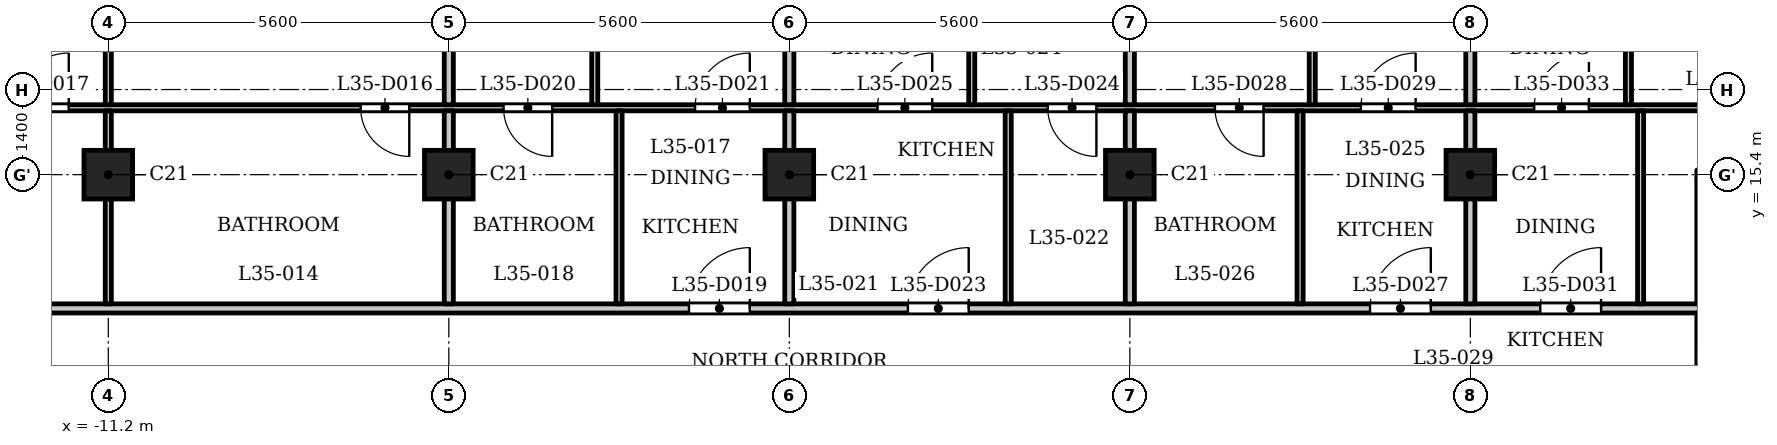
"""IFC4 building model, lengths in metres.
Left out: names, types, materials, properties, quantities, classifications, styles, units other than length and angle.
Written with IfcOpenShell. Run it as: python <this file> out.ifc"""

import sys

from ifc_helpers import new_model, si_unit, direction, frame, frame_2d, origin, origin_2d, place, context, subcontext, project, spatial, rectangle, extrude, element, fill, save


model = new_model("IFC4")
c1 = context("Model", 3, precision=1e-05, world=origin(), true_north=direction((0.0, 1.0)))
c2 = subcontext(c1, "Body", "Model", "MODEL_VIEW")
j1 = project(units=[si_unit("LENGTHUNIT", "METRE"), si_unit("PLANEANGLEUNIT", "RADIAN")], contexts=[c1])
p1 = place(None, origin())
s1 = spatial("IfcSite", under=j1, at=p1, CompositionType="ELEMENT")
p2 = place(p1, origin())
s2 = spatial("IfcBuilding", under=s1, at=p2, CompositionType="ELEMENT")
p3 = place(p2, frame((0.0, 0.0, 139.6)))
s3 = spatial("IfcBuildingStorey", under=s2, at=p3, CompositionType="ELEMENT", Elevation=139.6)
for number, where, z_axis, x_axis in (
    (1, (-11.2, 15.4, 0.0), (0.0, 0.0, 1.0), (1.0, 0.0, 0.0)),
    (2, (-5.6, 15.4, 0.0), (0.0, 0.0, 1.0), (1.0, 0.0, 0.0)),
    (3, (0.0, 15.4, 0.0), (0.0, 0.0, 1.0), (1.0, 0.0, 0.0)),
    (4, (5.6, 15.4, 0.0), (0.0, 0.0, 1.0), (1.0, 0.0, 0.0)),
    (5, (11.2, 15.4, 0.0), (0.0, 0.0, 1.0), (1.0, 0.0, 0.0)),
):
    element("IfcColumn", number, at=place(p3, frame(where, z_axis=z_axis, x_axis=x_axis)), inside=s3, PredefinedType="COLUMN", context=c2, shape_type="SweptSolid", body=[
        extrude(rectangle(XDim=0.8, YDim=0.8, at=origin_2d()), origin(), (0.0, 0.0, 1.0), 3.5),
    ])
p4 = place(p3, frame((-17.4, 13.2, 0.0), z_axis=(0.0, 0.0, 1.0), x_axis=(1.0, 0.0, 0.0)))
e6 = element("IfcWall", 6, at=p4, inside=s3, PredefinedType="PARTITIONING", context=c2, shape_type="SweptSolid", body=[
    extrude(rectangle(XDim=34.8, YDim=0.15, at=frame_2d((17.4, 0.0))), origin(), (0.0, 0.0, 1.0), 3.2),
])
p5 = place(p4, frame((0.25, 0.0, 0.0)))
e7 = element("IfcOpeningElement", 7, at=p5, cuts=e6, PredefinedType="OPENING", context=c2, shape_type="SweptSolid", body=[
    extrude(rectangle(XDim=1.0, YDim=2.1, at=frame_2d((0.5, 1.05))), frame((0.0, 0.085, 0.0), z_axis=(0.0, -1.0, 0.0), x_axis=(1.0, 0.0, 0.0)), (0.0, 0.0, 1.0), 0.17),
])
p6 = place(p4, frame((33.65, 0.0, 0.0)))
e8 = element("IfcOpeningElement", 8, at=p6, cuts=e6, PredefinedType="OPENING", context=c2, shape_type="SweptSolid", body=[
    extrude(rectangle(XDim=1.0, YDim=2.1, at=frame_2d((0.5, 1.05))), frame((0.0, 0.085, 0.0), z_axis=(0.0, -1.0, 0.0), x_axis=(1.0, 0.0, 0.0)), (0.0, 0.0, 1.0), 0.17),
])
p7 = place(p4, frame((15.75, 0.0, 0.0)))
e9 = element("IfcOpeningElement", 9, at=p7, cuts=e6, PredefinedType="OPENING", context=c2, shape_type="SweptSolid", body=[
    extrude(rectangle(XDim=1.0, YDim=2.1, at=frame_2d((0.5, 1.05))), frame((0.0, 0.085, 0.0), z_axis=(0.0, -1.0, 0.0), x_axis=(1.0, 0.0, 0.0)), (0.0, 0.0, 1.0), 0.17),
])
p8 = place(p4, frame((19.35, 0.0, 0.0)))
e10 = element("IfcOpeningElement", 10, at=p8, cuts=e6, PredefinedType="OPENING", context=c2, shape_type="SweptSolid", body=[
    extrude(rectangle(XDim=1.0, YDim=2.1, at=frame_2d((0.5, 1.05))), frame((0.0, 0.085, 0.0), z_axis=(0.0, -1.0, 0.0), x_axis=(1.0, 0.0, 0.0)), (0.0, 0.0, 1.0), 0.17),
])
p9 = place(p4, frame((26.95, 0.0, 0.0)))
e11 = element("IfcOpeningElement", 11, at=p9, cuts=e6, PredefinedType="OPENING", context=c2, shape_type="SweptSolid", body=[
    extrude(rectangle(XDim=1.0, YDim=2.1, at=frame_2d((0.5, 1.05))), frame((0.0, 0.085, 0.0), z_axis=(0.0, -1.0, 0.0), x_axis=(1.0, 0.0, 0.0)), (0.0, 0.0, 1.0), 0.17),
])
p10 = place(p4, frame((29.75, 0.0, 0.0)))
e12 = element("IfcOpeningElement", 12, at=p10, cuts=e6, PredefinedType="OPENING", context=c2, shape_type="SweptSolid", body=[
    extrude(rectangle(XDim=1.0, YDim=2.1, at=frame_2d((0.5, 1.05))), frame((0.0, 0.085, 0.0), z_axis=(0.0, -1.0, 0.0), x_axis=(1.0, 0.0, 0.0)), (0.0, 0.0, 1.0), 0.17),
])
p11 = place(p3, frame((14.925, 15.4, 0.0), z_axis=(0.0, 0.0, 1.0), x_axis=(1.0, 0.0, 0.0)))
e13 = element("IfcWall", 13, at=p11, inside=s3, PredefinedType="PARTITIONING", context=c2, shape_type="SweptSolid", body=[
    extrude(rectangle(XDim=12.559, YDim=0.15, at=frame_2d((6.279, 0.0))), origin(), (0.0, 0.0, 1.0), 3.2),
])
p12 = place(p11, frame((5.825, 0.0, 0.0)))
e14 = element("IfcOpeningElement", 14, at=p12, cuts=e13, PredefinedType="OPENING", context=c2, shape_type="SweptSolid", body=[
    extrude(rectangle(XDim=1.0, YDim=2.1, at=frame_2d((0.5, 1.05))), frame((0.0, 0.085, 0.0), z_axis=(0.0, -1.0, 0.0), x_axis=(1.0, 0.0, 0.0)), (0.0, 0.0, 1.0), 0.17),
])
p13 = place(p3, frame((-16.725, 16.5, 0.0), z_axis=(0.0, 0.0, 1.0), x_axis=(1.0, 0.0, 0.0)))
e15 = element("IfcWall", 15, at=p13, inside=s3, PredefinedType="PARTITIONING", context=c2, shape_type="SweptSolid", body=[
    extrude(rectangle(XDim=33.45, YDim=0.1, at=frame_2d((16.725, 0.0))), origin(), (0.0, 0.0, 1.0), 3.2),
])
p14 = place(p13, frame((9.675, 0.0, 0.0)))
e16 = element("IfcOpeningElement", 16, at=p14, cuts=e15, PredefinedType="OPENING", context=c2, shape_type="SweptSolid", body=[
    extrude(rectangle(XDim=0.8, YDim=2.1, at=frame_2d((0.4, 1.05))), frame((0.0, 0.06, 0.0), z_axis=(0.0, -1.0, 0.0), x_axis=(1.0, 0.0, 0.0)), (0.0, 0.0, 1.0), 0.12),
])
p15 = place(p13, frame((3.975, 0.0, 0.0)))
e17 = element("IfcOpeningElement", 17, at=p15, cuts=e15, PredefinedType="OPENING", context=c2, shape_type="SweptSolid", body=[
    extrude(rectangle(XDim=0.9, YDim=2.1, at=frame_2d((0.45, 1.05))), frame((0.0, 0.06, 0.0), z_axis=(0.0, -1.0, 0.0), x_axis=(1.0, 0.0, 0.0)), (0.0, 0.0, 1.0), 0.12),
])
p16 = place(p13, frame((12.025, 0.0, 0.0)))
e18 = element("IfcOpeningElement", 18, at=p16, cuts=e15, PredefinedType="OPENING", context=c2, shape_type="SweptSolid", body=[
    extrude(rectangle(XDim=0.8, YDim=2.1, at=frame_2d((0.4, 1.05))), frame((0.0, 0.06, 0.0), z_axis=(0.0, -1.0, 0.0), x_axis=(1.0, 0.0, 0.0)), (0.0, 0.0, 1.0), 0.12),
])
p17 = place(p13, frame((15.175, 0.0, 0.0)))
e19 = element("IfcOpeningElement", 19, at=p17, cuts=e15, PredefinedType="OPENING", context=c2, shape_type="SweptSolid", body=[
    extrude(rectangle(XDim=0.9, YDim=2.1, at=frame_2d((0.45, 1.05))), frame((0.0, 0.06, 0.0), z_axis=(0.0, -1.0, 0.0), x_axis=(1.0, 0.0, 0.0)), (0.0, 0.0, 1.0), 0.12),
])
p18 = place(p13, frame((20.975, 0.0, 0.0)))
e20 = element("IfcOpeningElement", 20, at=p18, cuts=e15, PredefinedType="OPENING", context=c2, shape_type="SweptSolid", body=[
    extrude(rectangle(XDim=0.8, YDim=2.1, at=frame_2d((0.4, 1.05))), frame((0.0, 0.06, 0.0), z_axis=(0.0, -1.0, 0.0), x_axis=(1.0, 0.0, 0.0)), (0.0, 0.0, 1.0), 0.12),
])
p19 = place(p13, frame((18.175, 0.0, 0.0)))
e21 = element("IfcOpeningElement", 21, at=p19, cuts=e15, PredefinedType="OPENING", context=c2, shape_type="SweptSolid", body=[
    extrude(rectangle(XDim=0.9, YDim=2.1, at=frame_2d((0.45, 1.05))), frame((0.0, 0.06, 0.0), z_axis=(0.0, -1.0, 0.0), x_axis=(1.0, 0.0, 0.0)), (0.0, 0.0, 1.0), 0.12),
])
p20 = place(p13, frame((23.725, 0.0, 0.0)))
e22 = element("IfcOpeningElement", 22, at=p20, cuts=e15, PredefinedType="OPENING", context=c2, shape_type="SweptSolid", body=[
    extrude(rectangle(XDim=0.8, YDim=2.1, at=frame_2d((0.4, 1.05))), frame((0.0, 0.06, 0.0), z_axis=(0.0, -1.0, 0.0), x_axis=(1.0, 0.0, 0.0)), (0.0, 0.0, 1.0), 0.12),
])
p21 = place(p13, frame((26.125, 0.0, 0.0)))
e23 = element("IfcOpeningElement", 23, at=p21, cuts=e15, PredefinedType="OPENING", context=c2, shape_type="SweptSolid", body=[
    extrude(rectangle(XDim=0.9, YDim=2.1, at=frame_2d((0.45, 1.05))), frame((0.0, 0.06, 0.0), z_axis=(0.0, -1.0, 0.0), x_axis=(1.0, 0.0, 0.0)), (0.0, 0.0, 1.0), 0.12),
])
p22 = place(p13, frame((32.125, 0.0, 0.0)))
e24 = element("IfcOpeningElement", 24, at=p22, cuts=e15, PredefinedType="OPENING", context=c2, shape_type="SweptSolid", body=[
    extrude(rectangle(XDim=0.8, YDim=2.1, at=frame_2d((0.4, 1.05))), frame((0.0, 0.06, 0.0), z_axis=(0.0, -1.0, 0.0), x_axis=(1.0, 0.0, 0.0)), (0.0, 0.0, 1.0), 0.12),
])
p23 = place(p13, frame((28.975, 0.0, 0.0)))
e25 = element("IfcOpeningElement", 25, at=p23, cuts=e15, PredefinedType="OPENING", context=c2, shape_type="SweptSolid", body=[
    extrude(rectangle(XDim=0.9, YDim=2.1, at=frame_2d((0.45, 1.05))), frame((0.0, 0.06, 0.0), z_axis=(0.0, -1.0, 0.0), x_axis=(1.0, 0.0, 0.0)), (0.0, 0.0, 1.0), 0.12),
])
p24 = place(p3, frame((-11.2, 13.275, 0.0), z_axis=(0.0, 0.0, 1.0), x_axis=(0.0, 1.0, 0.0)))
e26 = element("IfcWall", 26, at=p24, inside=s3, PredefinedType="PARTITIONING", context=c2, shape_type="SweptSolid", body=[
    extrude(rectangle(XDim=3.175, YDim=0.1, at=frame_2d((1.587, 0.0))), origin(), (0.0, 0.0, 1.0), 3.2),
])
p25 = place(p3, frame((-11.2, 16.55, 0.0), z_axis=(0.0, 0.0, 1.0), x_axis=(0.0, 1.0, 0.0)))
e27 = element("IfcWall", 27, at=p25, inside=s3, PredefinedType="PARTITIONING", context=c2, shape_type="SweptSolid", body=[
    extrude(rectangle(XDim=6.38, YDim=0.1, at=frame_2d((3.19, 0.0))), origin(), (0.0, 0.0, 1.0), 3.2),
])
p26 = place(p25, frame((4.1, 0.0, 0.0)))
e28 = element("IfcOpeningElement", 28, at=p26, cuts=e27, PredefinedType="OPENING", context=c2, shape_type="SweptSolid", body=[
    extrude(rectangle(XDim=0.9, YDim=2.1, at=frame_2d((0.45, 1.05))), frame((0.0, 0.06, 0.0), z_axis=(0.0, -1.0, 0.0), x_axis=(1.0, 0.0, 0.0)), (0.0, 0.0, 1.0), 0.12),
])
p27 = place(p3, frame((-5.6, 13.275, 0.0), z_axis=(0.0, 0.0, 1.0), x_axis=(0.0, 1.0, 0.0)))
e29 = element("IfcWall", 29, at=p27, inside=s3, PredefinedType="PARTITIONING", context=c2, shape_type="SweptSolid", body=[
    extrude(rectangle(XDim=3.175, YDim=0.15, at=frame_2d((1.587, 0.0))), origin(), (0.0, 0.0, 1.0), 3.2),
])
p28 = place(p3, frame((-5.6, 16.55, 0.0), z_axis=(0.0, 0.0, 1.0), x_axis=(0.0, 1.0, 0.0)))
e30 = element("IfcWall", 30, at=p28, inside=s3, PredefinedType="PARTITIONING", context=c2, shape_type="SweptSolid", body=[
    extrude(rectangle(XDim=6.38, YDim=0.15, at=frame_2d((3.19, 0.0))), origin(), (0.0, 0.0, 1.0), 3.2),
])
p29 = place(p3, frame((-3.2, 16.55, 0.0), z_axis=(0.0, 0.0, 1.0), x_axis=(0.0, 1.0, 0.0)))
e31 = element("IfcWall", 31, at=p29, inside=s3, PredefinedType="PARTITIONING", context=c2, shape_type="SweptSolid", body=[
    extrude(rectangle(XDim=5.53, YDim=0.1, at=frame_2d((2.765, 0.0))), origin(), (0.0, 0.0, 1.0), 3.2),
])
p30 = place(p29, frame((1.46, 0.0, 0.0)))
e32 = element("IfcOpeningElement", 32, at=p30, cuts=e31, PredefinedType="OPENING", context=c2, shape_type="SweptSolid", body=[
    extrude(rectangle(XDim=0.9, YDim=2.1, at=frame_2d((0.45, 1.05))), frame((0.0, 0.06, 0.0), z_axis=(0.0, -1.0, 0.0), x_axis=(1.0, 0.0, 0.0)), (0.0, 0.0, 1.0), 0.12),
])
p31 = place(p3, frame((-2.8, 13.275, 0.0), z_axis=(0.0, 0.0, 1.0), x_axis=(0.0, 1.0, 0.0)))
e33 = element("IfcWall", 33, at=p31, inside=s3, PredefinedType="PARTITIONING", context=c2, shape_type="SweptSolid", body=[
    extrude(rectangle(XDim=3.175, YDim=0.1, at=frame_2d((1.587, 0.0))), origin(), (0.0, 0.0, 1.0), 3.2),
])
p32 = place(p3, frame((0.0, 13.275, 0.0), z_axis=(0.0, 0.0, 1.0), x_axis=(0.0, 1.0, 0.0)))
e34 = element("IfcWall", 34, at=p32, inside=s3, PredefinedType="PARTITIONING", context=c2, shape_type="SweptSolid", body=[
    extrude(rectangle(XDim=3.175, YDim=0.15, at=frame_2d((1.587, 0.0))), origin(), (0.0, 0.0, 1.0), 3.2),
])
p33 = place(p3, frame((0.0, 16.55, 0.0), z_axis=(0.0, 0.0, 1.0), x_axis=(0.0, 1.0, 0.0)))
e35 = element("IfcWall", 35, at=p33, inside=s3, PredefinedType="PARTITIONING", context=c2, shape_type="SweptSolid", body=[
    extrude(rectangle(XDim=6.38, YDim=0.15, at=frame_2d((3.19, 0.0))), origin(), (0.0, 0.0, 1.0), 3.2),
])
p34 = place(p3, frame((3.0, 16.55, 0.0), z_axis=(0.0, 0.0, 1.0), x_axis=(0.0, 1.0, 0.0)))
e36 = element("IfcWall", 36, at=p34, inside=s3, PredefinedType="PARTITIONING", context=c2, shape_type="SweptSolid", body=[
    extrude(rectangle(XDim=5.53, YDim=0.1, at=frame_2d((2.765, 0.0))), origin(), (0.0, 0.0, 1.0), 3.2),
])
p35 = place(p34, frame((4.35, 0.0, 0.0)))
e37 = element("IfcOpeningElement", 37, at=p35, cuts=e36, PredefinedType="OPENING", context=c2, shape_type="SweptSolid", body=[
    extrude(rectangle(XDim=0.9, YDim=2.1, at=frame_2d((0.45, 1.05))), frame((0.0, 0.06, 0.0), z_axis=(0.0, -1.0, 0.0), x_axis=(1.0, 0.0, 0.0)), (0.0, 0.0, 1.0), 0.12),
])
p36 = place(p3, frame((3.6, 13.275, 0.0), z_axis=(0.0, 0.0, 1.0), x_axis=(0.0, 1.0, 0.0)))
e38 = element("IfcWall", 38, at=p36, inside=s3, PredefinedType="PARTITIONING", context=c2, shape_type="SweptSolid", body=[
    extrude(rectangle(XDim=3.175, YDim=0.1, at=frame_2d((1.587, 0.0))), origin(), (0.0, 0.0, 1.0), 3.2),
])
p37 = place(p3, frame((5.6, 13.275, 0.0), z_axis=(0.0, 0.0, 1.0), x_axis=(0.0, 1.0, 0.0)))
e39 = element("IfcWall", 39, at=p37, inside=s3, PredefinedType="PARTITIONING", context=c2, shape_type="SweptSolid", body=[
    extrude(rectangle(XDim=3.175, YDim=0.15, at=frame_2d((1.587, 0.0))), origin(), (0.0, 0.0, 1.0), 3.2),
])
p38 = place(p3, frame((5.6, 16.55, 0.0), z_axis=(0.0, 0.0, 1.0), x_axis=(0.0, 1.0, 0.0)))
e40 = element("IfcWall", 40, at=p38, inside=s3, PredefinedType="PARTITIONING", context=c2, shape_type="SweptSolid", body=[
    extrude(rectangle(XDim=6.38, YDim=0.15, at=frame_2d((3.19, 0.0))), origin(), (0.0, 0.0, 1.0), 3.2),
])
p39 = place(p3, frame((8.4, 13.275, 0.0), z_axis=(0.0, 0.0, 1.0), x_axis=(0.0, 1.0, 0.0)))
e41 = element("IfcWall", 41, at=p39, inside=s3, PredefinedType="PARTITIONING", context=c2, shape_type="SweptSolid", body=[
    extrude(rectangle(XDim=3.175, YDim=0.1, at=frame_2d((1.587, 0.0))), origin(), (0.0, 0.0, 1.0), 3.2),
])
p40 = place(p3, frame((8.6, 16.55, 0.0), z_axis=(0.0, 0.0, 1.0), x_axis=(0.0, 1.0, 0.0)))
e42 = element("IfcWall", 42, at=p40, inside=s3, PredefinedType="PARTITIONING", context=c2, shape_type="SweptSolid", body=[
    extrude(rectangle(XDim=5.53, YDim=0.1, at=frame_2d((2.765, 0.0))), origin(), (0.0, 0.0, 1.0), 3.2),
])
p41 = place(p40, frame((1.21, 0.0, 0.0)))
e43 = element("IfcOpeningElement", 43, at=p41, cuts=e42, PredefinedType="OPENING", context=c2, shape_type="SweptSolid", body=[
    extrude(rectangle(XDim=0.9, YDim=2.1, at=frame_2d((0.45, 1.05))), frame((0.0, 0.06, 0.0), z_axis=(0.0, -1.0, 0.0), x_axis=(1.0, 0.0, 0.0)), (0.0, 0.0, 1.0), 0.12),
])
p42 = place(p3, frame((11.2, 13.275, 0.0), z_axis=(0.0, 0.0, 1.0), x_axis=(0.0, 1.0, 0.0)))
e44 = element("IfcWall", 44, at=p42, inside=s3, PredefinedType="PARTITIONING", context=c2, shape_type="SweptSolid", body=[
    extrude(rectangle(XDim=3.175, YDim=0.15, at=frame_2d((1.587, 0.0))), origin(), (0.0, 0.0, 1.0), 3.2),
])
p43 = place(p3, frame((11.2, 16.55, 0.0), z_axis=(0.0, 0.0, 1.0), x_axis=(0.0, 1.0, 0.0)))
e45 = element("IfcWall", 45, at=p43, inside=s3, PredefinedType="PARTITIONING", context=c2, shape_type="SweptSolid", body=[
    extrude(rectangle(XDim=6.38, YDim=0.15, at=frame_2d((3.19, 0.0))), origin(), (0.0, 0.0, 1.0), 3.2),
])
p44 = place(p3, frame((13.8, 16.55, 0.0), z_axis=(0.0, 0.0, 1.0), x_axis=(0.0, 1.0, 0.0)))
e46 = element("IfcWall", 46, at=p44, inside=s3, PredefinedType="PARTITIONING", context=c2, shape_type="SweptSolid", body=[
    extrude(rectangle(XDim=5.53, YDim=0.1, at=frame_2d((2.765, 0.0))), origin(), (0.0, 0.0, 1.0), 3.2),
])
p45 = place(p44, frame((4.35, 0.0, 0.0)))
e47 = element("IfcOpeningElement", 47, at=p45, cuts=e46, PredefinedType="OPENING", context=c2, shape_type="SweptSolid", body=[
    extrude(rectangle(XDim=0.9, YDim=2.1, at=frame_2d((0.45, 1.05))), frame((0.0, 0.06, 0.0), z_axis=(0.0, -1.0, 0.0), x_axis=(1.0, 0.0, 0.0)), (0.0, 0.0, 1.0), 0.12),
])
p46 = place(p3, frame((14.0, 13.275, 0.0), z_axis=(0.0, 0.0, 1.0), x_axis=(0.0, 1.0, 0.0)))
e48 = element("IfcWall", 48, at=p46, inside=s3, PredefinedType="PARTITIONING", context=c2, shape_type="SweptSolid", body=[
    extrude(rectangle(XDim=3.175, YDim=0.1, at=frame_2d((1.587, 0.0))), origin(), (0.0, 0.0, 1.0), 3.2),
])
p47 = place(p14, origin())
e49 = element("IfcDoor", 49, at=p47, inside=s3, OperationType="SINGLE_SWING_RIGHT", PredefinedType="DOOR", context=c2, shape_type="SweptSolid", body=[
    extrude(rectangle(XDim=0.8, YDim=2.1, at=frame_2d((0.4, 1.05))), frame((0.0, 0.025, 0.0), z_axis=(0.0, -1.0, 0.0), x_axis=(1.0, 0.0, 0.0)), (0.0, 0.0, 1.0), 0.05),
])
fill(e16, e49)
p48 = place(p15, origin())
e50 = element("IfcDoor", 50, at=p48, inside=s3, OperationType="SINGLE_SWING_LEFT", PredefinedType="DOOR", context=c2, shape_type="SweptSolid", body=[
    extrude(rectangle(XDim=0.9, YDim=2.1, at=frame_2d((0.45, 1.05))), frame((0.0, 0.025, 0.0), z_axis=(0.0, -1.0, 0.0), x_axis=(1.0, 0.0, 0.0)), (0.0, 0.0, 1.0), 0.05),
])
fill(e17, e50)
p49 = place(p7, origin())
e51 = element("IfcDoor", 51, at=p49, inside=s3, OperationType="SINGLE_SWING_LEFT", PredefinedType="DOOR", context=c2, shape_type="SweptSolid", body=[
    extrude(rectangle(XDim=1.0, YDim=2.1, at=frame_2d((0.5, 1.05))), frame((0.0, 0.025, 0.0), z_axis=(0.0, -1.0, 0.0), x_axis=(1.0, 0.0, 0.0)), (0.0, 0.0, 1.0), 0.05),
])
fill(e9, e51)
p50 = place(p16, origin())
e52 = element("IfcDoor", 52, at=p50, inside=s3, OperationType="SINGLE_SWING_RIGHT", PredefinedType="DOOR", context=c2, shape_type="SweptSolid", body=[
    extrude(rectangle(XDim=0.8, YDim=2.1, at=frame_2d((0.4, 1.05))), frame((0.0, 0.025, 0.0), z_axis=(0.0, -1.0, 0.0), x_axis=(1.0, 0.0, 0.0)), (0.0, 0.0, 1.0), 0.05),
])
fill(e18, e52)
p51 = place(p17, origin())
e53 = element("IfcDoor", 53, at=p51, inside=s3, OperationType="SINGLE_SWING_LEFT", PredefinedType="DOOR", context=c2, shape_type="SweptSolid", body=[
    extrude(rectangle(XDim=0.9, YDim=2.1, at=frame_2d((0.45, 1.05))), frame((0.0, 0.025, 0.0), z_axis=(0.0, -1.0, 0.0), x_axis=(1.0, 0.0, 0.0)), (0.0, 0.0, 1.0), 0.05),
])
fill(e19, e53)
p52 = place(p8, origin())
e54 = element("IfcDoor", 54, at=p52, inside=s3, OperationType="SINGLE_SWING_LEFT", PredefinedType="DOOR", context=c2, shape_type="SweptSolid", body=[
    extrude(rectangle(XDim=1.0, YDim=2.1, at=frame_2d((0.5, 1.05))), frame((0.0, 0.025, 0.0), z_axis=(0.0, -1.0, 0.0), x_axis=(1.0, 0.0, 0.0)), (0.0, 0.0, 1.0), 0.05),
])
fill(e10, e54)
p53 = place(p18, origin())
e55 = element("IfcDoor", 55, at=p53, inside=s3, OperationType="SINGLE_SWING_RIGHT", PredefinedType="DOOR", context=c2, shape_type="SweptSolid", body=[
    extrude(rectangle(XDim=0.8, YDim=2.1, at=frame_2d((0.4, 1.05))), frame((0.0, 0.025, 0.0), z_axis=(0.0, -1.0, 0.0), x_axis=(1.0, 0.0, 0.0)), (0.0, 0.0, 1.0), 0.05),
])
fill(e20, e55)
p54 = place(p19, origin())
e56 = element("IfcDoor", 56, at=p54, inside=s3, OperationType="SINGLE_SWING_LEFT", PredefinedType="DOOR", context=c2, shape_type="SweptSolid", body=[
    extrude(rectangle(XDim=0.9, YDim=2.1, at=frame_2d((0.45, 1.05))), frame((0.0, 0.025, 0.0), z_axis=(0.0, -1.0, 0.0), x_axis=(1.0, 0.0, 0.0)), (0.0, 0.0, 1.0), 0.05),
])
fill(e21, e56)
p55 = place(p9, origin())
e57 = element("IfcDoor", 57, at=p55, inside=s3, OperationType="SINGLE_SWING_LEFT", PredefinedType="DOOR", context=c2, shape_type="SweptSolid", body=[
    extrude(rectangle(XDim=1.0, YDim=2.1, at=frame_2d((0.5, 1.05))), frame((0.0, 0.025, 0.0), z_axis=(0.0, -1.0, 0.0), x_axis=(1.0, 0.0, 0.0)), (0.0, 0.0, 1.0), 0.05),
])
fill(e11, e57)
p56 = place(p20, origin())
e58 = element("IfcDoor", 58, at=p56, inside=s3, OperationType="SINGLE_SWING_RIGHT", PredefinedType="DOOR", context=c2, shape_type="SweptSolid", body=[
    extrude(rectangle(XDim=0.8, YDim=2.1, at=frame_2d((0.4, 1.05))), frame((0.0, 0.025, 0.0), z_axis=(0.0, -1.0, 0.0), x_axis=(1.0, 0.0, 0.0)), (0.0, 0.0, 1.0), 0.05),
])
fill(e22, e58)
p57 = place(p21, origin())
e59 = element("IfcDoor", 59, at=p57, inside=s3, OperationType="SINGLE_SWING_LEFT", PredefinedType="DOOR", context=c2, shape_type="SweptSolid", body=[
    extrude(rectangle(XDim=0.9, YDim=2.1, at=frame_2d((0.45, 1.05))), frame((0.0, 0.025, 0.0), z_axis=(0.0, -1.0, 0.0), x_axis=(1.0, 0.0, 0.0)), (0.0, 0.0, 1.0), 0.05),
])
fill(e23, e59)
p58 = place(p10, origin())
e60 = element("IfcDoor", 60, at=p58, inside=s3, OperationType="SINGLE_SWING_LEFT", PredefinedType="DOOR", context=c2, shape_type="SweptSolid", body=[
    extrude(rectangle(XDim=1.0, YDim=2.1, at=frame_2d((0.5, 1.05))), frame((0.0, 0.025, 0.0), z_axis=(0.0, -1.0, 0.0), x_axis=(1.0, 0.0, 0.0)), (0.0, 0.0, 1.0), 0.05),
])
fill(e12, e60)
p59 = place(p23, origin())
e61 = element("IfcDoor", 61, at=p59, inside=s3, OperationType="SINGLE_SWING_LEFT", PredefinedType="DOOR", context=c2, shape_type="SweptSolid", body=[
    extrude(rectangle(XDim=0.9, YDim=2.1, at=frame_2d((0.45, 1.05))), frame((0.0, 0.025, 0.0), z_axis=(0.0, -1.0, 0.0), x_axis=(1.0, 0.0, 0.0)), (0.0, 0.0, 1.0), 0.05),
])
fill(e25, e61)
save(model, sys.argv[1])
